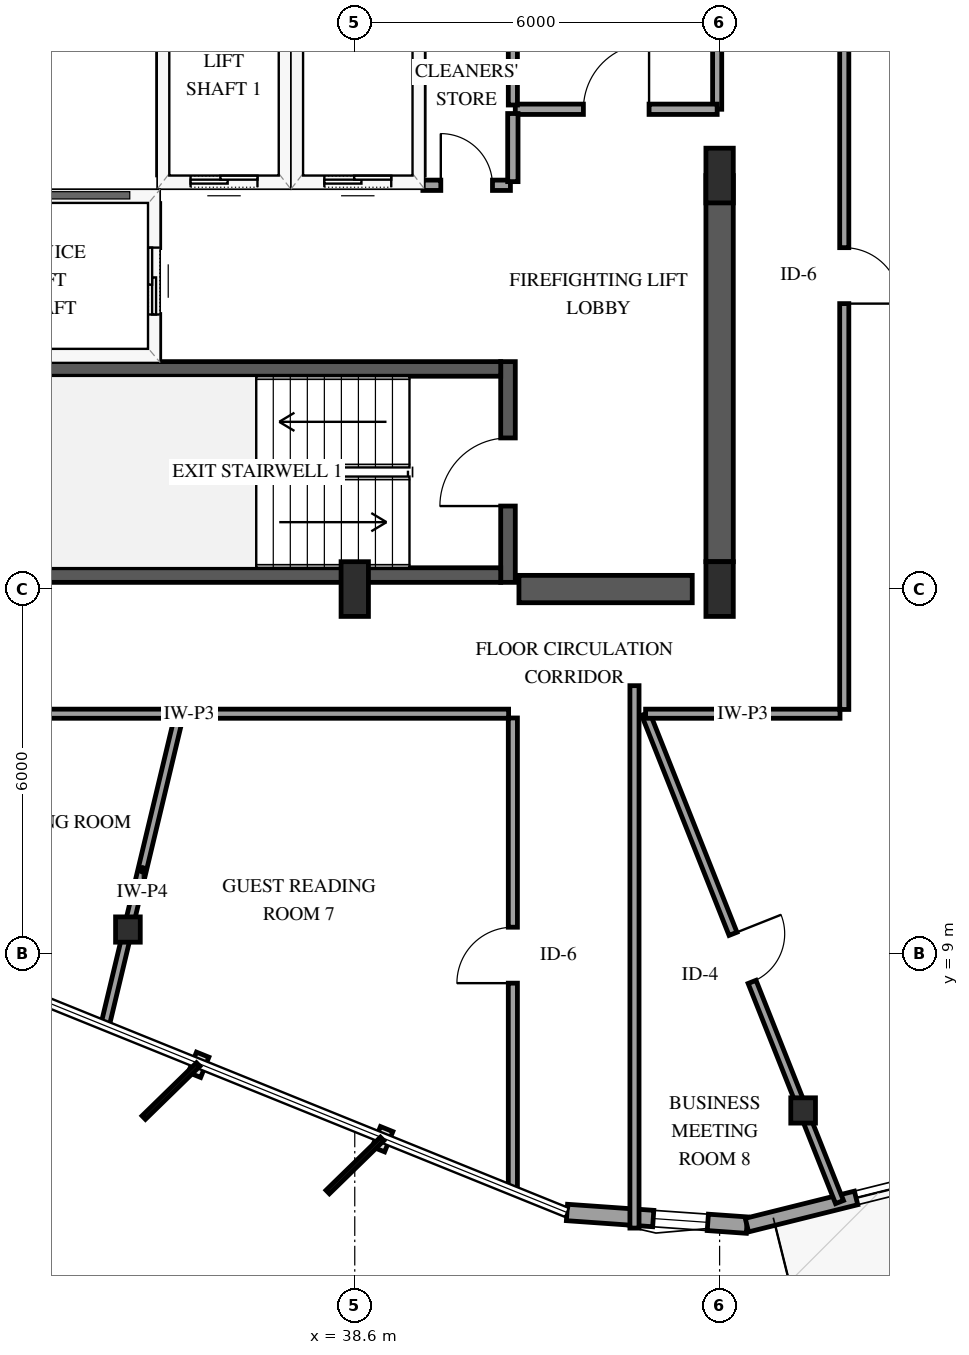
"""IFC4 building model, lengths in metres.
Left out: names, types, materials, properties, quantities, classifications, styles, units other than length and angle.
Written with IfcOpenShell. Run it as: python <this file> out.ifc"""

import sys

from ifc_helpers import new_model, si_unit, direction, frame, frame_2d, origin, origin_2d, place, context, subcontext, project, spatial, rectangle, i_section, extrude, element, fill, save


model = new_model("IFC4")
c1 = context("Model", 3, precision=1e-05, world=origin(), true_north=direction((0.0, 1.0)))
c2 = subcontext(c1, "Body", "Model", "MODEL_VIEW")
j1 = project(units=[si_unit("LENGTHUNIT", "METRE"), si_unit("PLANEANGLEUNIT", "RADIAN")], contexts=[c1])
p1 = place(None, origin())
s1 = spatial("IfcSite", under=j1, at=p1, CompositionType="ELEMENT")
p2 = place(p1, origin())
s2 = spatial("IfcBuilding", under=s1, at=p2, CompositionType="ELEMENT")
p3 = place(p2, frame((0.0, 0.0, 215.8)))
s3 = spatial("IfcBuildingStorey", under=s2, at=p3, CompositionType="ELEMENT", Elevation=215.8)
p4 = place(p3, frame((41.12, 15.11, 0.0), z_axis=(0.0, 0.0, 1.0), x_axis=(0.0, 1.0, 0.0)))
e1 = element("IfcWall", 1, at=p4, inside=s3, PredefinedType="SHEAR", context=c2, shape_type="SweptSolid", body=[
    extrude(rectangle(XDim=3.63, YDim=0.24, at=frame_2d((1.815, 0.0))), origin(), (0.0, 0.0, 1.0), 3.6),
])
p5 = place(p4, frame((1.255, 0.0, 0.0)))
e2 = element("IfcOpeningElement", 2, at=p5, cuts=e1, PredefinedType="OPENING", context=c2, shape_type="SweptSolid", body=[
    extrude(rectangle(XDim=1.12, YDim=2.15, at=frame_2d((0.56, 1.075))), frame((0.0, 0.13, 0.0), z_axis=(0.0, -1.0, 0.0), x_axis=(1.0, 0.0, 0.0)), (0.0, 0.0, 1.0), 0.26),
])
for number, where, z_axis, x_axis in (
    (3, (33.0, 15.23, 0.0), (0.0, 0.0, 1.0), (1.0, 0.0, 0.0)),
    (4, (33.0, 18.62, 0.0), (0.0, 0.0, 1.0), (1.0, 0.0, 0.0)),
):
    element("IfcWall", number, at=place(p3, frame(where, z_axis=z_axis, x_axis=x_axis)), inside=s3, PredefinedType="SHEAR", context=c2, shape_type="SweptSolid", body=[
        extrude(rectangle(XDim=8.0, YDim=0.24, at=frame_2d((4.0, 0.0))), origin(), (0.0, 0.0, 1.0), 3.6),
    ])
p6 = place(p3, frame((41.3, 15.0, 0.0), z_axis=(0.0, 0.0, 1.0), x_axis=(1.0, 0.0, 0.0)))
e5 = element("IfcWall", 5, at=p6, inside=s3, PredefinedType="SHEAR", context=c2, shape_type="SweptSolid", body=[
    extrude(rectangle(XDim=2.85, YDim=0.45, at=frame_2d((1.425, 0.0))), origin(), (0.0, 0.0, 1.0), 3.6),
])
p7 = place(p3, frame((44.6, 15.45, 0.0), z_axis=(0.0, 0.0, 1.0), x_axis=(0.0, 1.0, 0.0)))
e6 = element("IfcWall", 6, at=p7, inside=s3, PredefinedType="SHEAR", context=c2, shape_type="SweptSolid", body=[
    extrude(rectangle(XDim=6.35, YDim=0.45, at=frame_2d((3.175, 0.0))), origin(), (0.0, 0.0, 1.0), 3.6),
])
for number, where, z_axis, x_axis in (
    (7, (38.6, 15.0, 0.0), (0.0, 0.0, 1.0), (1.0, 0.0, 0.0)),
    (8, (44.6, 15.0, 0.0), (0.0, 0.0, 1.0), (1.0, 0.0, 0.0)),
    (9, (44.6, 21.8, 0.0), (0.0, 0.0, 1.0), (1.0, 0.0, 0.0)),
):
    element("IfcColumn", number, at=place(p3, frame(where, z_axis=z_axis, x_axis=x_axis)), inside=s3, PredefinedType="PILASTER", context=c2, shape_type="SweptSolid", body=[
        extrude(rectangle(XDim=0.45, YDim=0.9, at=origin_2d()), origin(), (0.0, 0.0, 1.0), 3.6),
    ])
for number, where, z_axis, x_axis in (
    (10, (34.87, 9.401, 0.0), (0.0, 0.0, 1.0), (1.0, 0.0, 0.0)),
    (11, (45.973, 6.426, 0.0), (0.0, 0.0, 1.0), (1.0, 0.0, 0.0)),
):
    element("IfcColumn", number, at=place(p3, frame(where, z_axis=z_axis, x_axis=x_axis)), inside=s3, PredefinedType="COLUMN", context=c2, shape_type="SweptSolid", body=[
        extrude(i_section(OverallWidth=0.406, OverallDepth=0.416, WebThickness=0.03, FlangeThickness=0.048, FilletRadius=0.038, at=origin_2d()), origin(), (0.0, 0.0, 1.0), 3.6),
    ])
p8 = place(p3, frame((42.09, 4.748, 0.0), z_axis=(0.0, 0.0, 1.0), x_axis=(0.997538688481, -0.070118221482, 0.0)))
e12 = element("IfcWall", 12, at=p8, inside=s3, PredefinedType="SOLIDWALL", context=c2, shape_type="SweptSolid", body=[
    extrude(rectangle(XDim=2.967, YDim=0.27, at=frame_2d((1.483, 0.0))), origin(), (0.0, 0.0, 1.0), 2.679),
])
p9 = place(p8, frame((1.422, 0.0, 0.75)))
e13 = element("IfcOpeningElement", 13, at=p9, cuts=e12, PredefinedType="OPENING", context=c2, shape_type="SweptSolid", body=[
    extrude(rectangle(XDim=0.9, YDim=1.5, at=frame_2d((0.45, 0.75))), frame((0.0, 0.145, 0.0), z_axis=(0.0, -1.0, 0.0), x_axis=(1.0, 0.0, 0.0)), (0.0, 0.0, 1.0), 0.29),
])
p10 = place(p3, frame((45.049, 4.54, 0.0), z_axis=(0.0, 0.0, 1.0), x_axis=(0.970379664845, 0.241584987229, 0.0)))
e14 = element("IfcWall", 14, at=p10, inside=s3, PredefinedType="SOLIDWALL", context=c2, shape_type="SweptSolid", body=[
    extrude(rectangle(XDim=9.791, YDim=0.23, at=frame_2d((4.895, 0.0))), origin(), (0.0, 0.0, 1.0), 2.679),
])
p11 = place(p10, frame((4.395, 0.0, 0.0)))
e15 = element("IfcOpeningElement", 15, at=p11, cuts=e14, PredefinedType="OPENING", context=c2, shape_type="SweptSolid", body=[
    extrude(rectangle(XDim=1.0, YDim=2.15, at=frame_2d((0.5, 1.075))), frame((0.0, 0.125, 0.0), z_axis=(0.0, -1.0, 0.0), x_axis=(1.0, 0.0, 0.0)), (0.0, 0.0, 1.0), 0.25),
])
p12 = place(p10, frame((1.85, 0.0, 0.72)))
e16 = element("IfcOpeningElement", 16, at=p12, cuts=e14, PredefinedType="OPENING", context=c2, shape_type="SweptSolid", body=[
    extrude(rectangle(XDim=1.2, YDim=1.6, at=frame_2d((0.6, 0.8))), frame((0.0, 0.125, 0.0), z_axis=(0.0, -1.0, 0.0), x_axis=(1.0, 0.0, 0.0)), (0.0, 0.0, 1.0), 0.25),
])
p13 = place(p10, frame((6.035, 0.0, 0.72)))
e17 = element("IfcOpeningElement", 17, at=p13, cuts=e14, PredefinedType="OPENING", context=c2, shape_type="SweptSolid", body=[
    extrude(rectangle(XDim=1.2, YDim=1.6, at=frame_2d((0.6, 0.8))), frame((0.0, 0.125, 0.0), z_axis=(0.0, -1.0, 0.0), x_axis=(1.0, 0.0, 0.0)), (0.0, 0.0, 1.0), 0.25),
])
p14 = place(p3, frame((35.45, 21.7, 0.0), z_axis=(0.0, 0.0, 1.0), x_axis=(1.0, 0.0, 0.0)))
e18 = element("IfcWall", 18, at=p14, inside=s3, PredefinedType="SOLIDWALL", context=c2, shape_type="SweptSolid", body=[
    extrude(rectangle(XDim=2.0, YDim=0.185, at=frame_2d((1.0, 0.0))), origin(), (0.0, 0.0, 1.0), 3.3),
])
p15 = place(p14, frame((0.45, 0.0, 0.0)))
e19 = element("IfcOpeningElement", 19, at=p15, cuts=e18, PredefinedType="OPENING", context=c2, shape_type="SweptSolid", body=[
    extrude(rectangle(XDim=1.1, YDim=2.15, at=frame_2d((0.55, 1.075))), frame((0.0, 0.103, 0.0), z_axis=(0.0, -1.0, 0.0), x_axis=(1.0, 0.0, 0.0)), (0.0, 0.0, 1.0), 0.205),
])
for number, where, z_axis, x_axis in (
    (20, (35.45, 21.81, 0.0), (0.0, 0.0, 1.0), (0.0, 1.0, 0.0)),
    (21, (37.45, 21.81, 0.0), (0.0, 0.0, 1.0), (0.0, 1.0, 0.0)),
):
    element("IfcWall", number, at=place(p3, frame(where, z_axis=z_axis, x_axis=x_axis)), inside=s3, PredefinedType="SOLIDWALL", context=c2, shape_type="SweptSolid", body=[
        extrude(rectangle(XDim=2.38, YDim=0.185, at=frame_2d((1.19, 0.0))), origin(), (0.0, 0.0, 1.0), 3.3),
    ])
p16 = place(p3, frame((37.65, 21.7, 0.0), z_axis=(0.0, 0.0, 1.0), x_axis=(1.0, 0.0, 0.0)))
e22 = element("IfcWall", 22, at=p16, inside=s3, PredefinedType="SOLIDWALL", context=c2, shape_type="SweptSolid", body=[
    extrude(rectangle(XDim=2.0, YDim=0.185, at=frame_2d((1.0, 0.0))), origin(), (0.0, 0.0, 1.0), 3.3),
])
p17 = place(p16, frame((0.45, 0.0, 0.0)))
e23 = element("IfcOpeningElement", 23, at=p17, cuts=e22, PredefinedType="OPENING", context=c2, shape_type="SweptSolid", body=[
    extrude(rectangle(XDim=1.1, YDim=2.15, at=frame_2d((0.55, 1.075))), frame((0.0, 0.103, 0.0), z_axis=(0.0, -1.0, 0.0), x_axis=(1.0, 0.0, 0.0)), (0.0, 0.0, 1.0), 0.205),
])
p18 = place(p3, frame((39.65, 21.81, 0.0), z_axis=(0.0, 0.0, 1.0), x_axis=(0.0, 1.0, 0.0)))
e24 = element("IfcWall", 24, at=p18, inside=s3, PredefinedType="SOLIDWALL", context=c2, shape_type="SweptSolid", body=[
    extrude(rectangle(XDim=2.38, YDim=0.185, at=frame_2d((1.19, 0.0))), origin(), (0.0, 0.0, 1.0), 3.3),
])
p19 = place(p3, frame((32.72, 21.45, 0.0), z_axis=(0.0, 0.0, 1.0), x_axis=(1.0, 0.0, 0.0)))
e25 = element("IfcWall", 25, at=p19, inside=s3, PredefinedType="SOLIDWALL", context=c2, shape_type="SweptSolid", body=[
    extrude(rectangle(XDim=2.58, YDim=0.185, at=frame_2d((1.29, 0.0))), origin(), (0.0, 0.0, 1.0), 3.3),
])
p20 = place(p3, frame((35.3, 18.79, 0.0), z_axis=(0.0, 0.0, 1.0), x_axis=(0.0, 1.0, 0.0)))
e26 = element("IfcWall", 26, at=p20, inside=s3, PredefinedType="SOLIDWALL", context=c2, shape_type="SweptSolid", body=[
    extrude(rectangle(XDim=2.55, YDim=0.185, at=frame_2d((1.275, 0.0))), origin(), (0.0, 0.0, 1.0), 3.3),
])
p21 = place(p20, frame((0.725, 0.0, 0.0)))
e27 = element("IfcOpeningElement", 27, at=p21, cuts=e26, PredefinedType="OPENING", context=c2, shape_type="SweptSolid", body=[
    extrude(rectangle(XDim=1.1, YDim=2.15, at=frame_2d((0.55, 1.075))), frame((0.0, 0.103, 0.0), z_axis=(0.0, -1.0, 0.0), x_axis=(1.0, 0.0, 0.0)), (0.0, 0.0, 1.0), 0.205),
])
p22 = place(p3, frame((46.65, 27.258, 0.0), z_axis=(0.0, 0.0, 1.0), x_axis=(0.0, -1.0, 0.0)))
e28 = element("IfcWall", 28, at=p22, inside=s3, PredefinedType="PARTITIONING", context=c2, shape_type="SweptSolid", body=[
    extrude(rectangle(XDim=14.238, YDim=0.15, at=frame_2d((7.119, 0.0))), origin(), (0.0, 0.0, 1.0), 3.3),
])
p23 = place(p22, frame((6.644, 0.0, 0.0)))
e29 = element("IfcOpeningElement", 29, at=p23, cuts=e28, PredefinedType="OPENING", context=c2, shape_type="SweptSolid", body=[
    extrude(rectangle(XDim=0.92, YDim=2.12, at=frame_2d((0.46, 1.06))), frame((0.0, 0.085, 0.0), z_axis=(0.0, -1.0, 0.0), x_axis=(1.0, 0.0, 0.0)), (0.0, 0.0, 1.0), 0.17),
])
p24 = place(p3, frame((43.383, 12.95, 0.0), z_axis=(0.0, 0.0, 1.0), x_axis=(0.369051252382, -0.929409045101, 0.0)))
e30 = element("IfcWall", 30, at=p24, inside=s3, PredefinedType="PARTITIONING", context=c2, shape_type="SweptSolid", body=[
    extrude(rectangle(XDim=8.641, YDim=0.14, at=frame_2d((4.32, 0.0))), origin(), (0.0, 0.0, 1.0), 2.595),
])
p25 = place(p24, frame((3.895, 0.0, 0.0)))
e31 = element("IfcOpeningElement", 31, at=p25, cuts=e30, PredefinedType="OPENING", context=c2, shape_type="SweptSolid", body=[
    extrude(rectangle(XDim=0.85, YDim=2.1, at=frame_2d((0.425, 1.05))), frame((0.0, 0.08, 0.0), z_axis=(0.0, -1.0, 0.0), x_axis=(1.0, 0.0, 0.0)), (0.0, 0.0, 1.0), 0.16),
])
p26 = place(p3, frame((41.2, 5.108, 0.0), z_axis=(0.0, 0.0, 1.0), x_axis=(0.0, 1.0, 0.0)))
e32 = element("IfcWall", 32, at=p26, inside=s3, PredefinedType="PARTITIONING", context=c2, shape_type="SweptSolid", body=[
    extrude(rectangle(XDim=7.772, YDim=0.15, at=frame_2d((3.886, 0.0))), origin(), (0.0, 0.0, 1.0), 3.3),
])
p27 = place(p26, frame((3.411, 0.0, 0.0)))
e33 = element("IfcOpeningElement", 33, at=p27, cuts=e32, PredefinedType="OPENING", context=c2, shape_type="SweptSolid", body=[
    extrude(rectangle(XDim=0.92, YDim=2.12, at=frame_2d((0.46, 1.06))), frame((0.0, 0.085, 0.0), z_axis=(0.0, -1.0, 0.0), x_axis=(1.0, 0.0, 0.0)), (0.0, 0.0, 1.0), 0.17),
])
p28 = place(p3, frame((44.56, 29.8, 0.0), z_axis=(0.0, 0.0, 1.0), x_axis=(0.0, -1.0, 0.0)))
e34 = element("IfcWall", 34, at=p28, inside=s3, PredefinedType="PARTITIONING", context=c2, shape_type="SweptSolid", body=[
    extrude(rectangle(XDim=6.91, YDim=0.15, at=frame_2d((3.455, 0.0))), origin(), (0.0, 0.0, 1.0), 2.34),
])
p29 = place(p28, frame((2.915, 0.0, 0.0)))
e35 = element("IfcOpeningElement", 35, at=p29, cuts=e34, PredefinedType="OPENING", context=c2, shape_type="SweptSolid", body=[
    extrude(rectangle(XDim=1.08, YDim=2.15, at=frame_2d((0.54, 1.075))), frame((0.0, 0.085, 0.0), z_axis=(0.0, -1.0, 0.0), x_axis=(1.0, 0.0, 0.0)), (0.0, 0.0, 1.0), 0.17),
])
p30 = place(p3, frame((41.13, 12.95, 0.0), z_axis=(0.0, 0.0, 1.0), x_axis=(-1.0, 0.0, 0.0)))
e36 = element("IfcWall", 36, at=p30, inside=s3, PredefinedType="PARTITIONING", context=c2, shape_type="SweptSolid", body=[
    extrude(rectangle(XDim=5.411, YDim=0.15, at=frame_2d((2.706, 0.0))), origin(), (0.0, 0.0, 1.0), 3.3),
])
p31 = place(p3, frame((35.719, 12.95, 0.0), z_axis=(0.0, 0.0, 1.0), x_axis=(-0.232634127557, -0.972564323166, 0.0)))
e37 = element("IfcWall", 37, at=p31, inside=s3, PredefinedType="PARTITIONING", context=c2, shape_type="SweptSolid", body=[
    extrude(rectangle(XDim=5.275, YDim=0.14, at=frame_2d((2.637, 0.0))), origin(), (0.0, 0.0, 1.0), 2.595),
])
p32 = place(p3, frame((35.719, 12.95, 0.0), z_axis=(0.0, 0.0, 1.0), x_axis=(-1.0, 0.0, 0.0)))
e38 = element("IfcWall", 38, at=p32, inside=s3, PredefinedType="PARTITIONING", context=c2, shape_type="SweptSolid", body=[
    extrude(rectangle(XDim=5.099, YDim=0.15, at=frame_2d((2.549, 0.0))), origin(), (0.0, 0.0, 1.0), 3.3),
])
p33 = place(p3, frame((41.24, 22.89, 0.0), z_axis=(0.0, 0.0, 1.0), x_axis=(1.0, 0.0, 0.0)))
e39 = element("IfcWall", 39, at=p33, inside=s3, PredefinedType="PARTITIONING", context=c2, shape_type="SweptSolid", body=[
    extrude(rectangle(XDim=3.32, YDim=0.17, at=frame_2d((1.66, 0.0))), origin(), (0.0, 0.0, 1.0), 3.3),
])
p34 = place(p33, frame((1.12, 0.0, 0.0)))
e40 = element("IfcOpeningElement", 40, at=p34, cuts=e39, PredefinedType="OPENING", context=c2, shape_type="SweptSolid", body=[
    extrude(rectangle(XDim=1.08, YDim=2.15, at=frame_2d((0.54, 1.075))), frame((0.0, 0.095, 0.0), z_axis=(0.0, -1.0, 0.0), x_axis=(1.0, 0.0, 0.0)), (0.0, 0.0, 1.0), 0.19),
])
p35 = place(p3, frame((46.58, 12.95, 0.0), z_axis=(0.0, 0.0, 1.0), x_axis=(-1.0, 0.0, 0.0)))
e41 = element("IfcWall", 41, at=p35, inside=s3, PredefinedType="PARTITIONING", context=c2, shape_type="SweptSolid", body=[
    extrude(rectangle(XDim=3.197, YDim=0.15, at=frame_2d((1.599, 0.0))), origin(), (0.0, 0.0, 1.0), 3.3),
])
p36 = place(p3, frame((41.2, 22.96, 0.0), z_axis=(0.0, 0.0, 1.0), x_axis=(0.0, 1.0, 0.0)))
e42 = element("IfcWall", 42, at=p36, inside=s3, PredefinedType="PARTITIONING", context=c2, shape_type="SweptSolid", body=[
    extrude(rectangle(XDim=1.69, YDim=0.15, at=frame_2d((0.845, 0.0))), origin(), (0.0, 0.0, 1.0), 3.3),
])
p37 = place(p3, frame((39.72, 21.64, 0.0), z_axis=(0.0, 0.0, 1.0), x_axis=(1.0, 0.0, 0.0)))
e43 = element("IfcWall", 43, at=p37, inside=s3, PredefinedType="PARTITIONING", context=c2, shape_type="SweptSolid", body=[
    extrude(rectangle(XDim=1.44, YDim=0.17, at=frame_2d((0.72, 0.0))), origin(), (0.0, 0.0, 1.0), 3.3),
])
p38 = place(p37, frame((0.295, 0.0, 0.0)))
e44 = element("IfcOpeningElement", 44, at=p38, cuts=e43, PredefinedType="OPENING", context=c2, shape_type="SweptSolid", body=[
    extrude(rectangle(XDim=0.85, YDim=2.1, at=frame_2d((0.425, 1.05))), frame((0.0, 0.095, 0.0), z_axis=(0.0, -1.0, 0.0), x_axis=(1.0, 0.0, 0.0)), (0.0, 0.0, 1.0), 0.19),
])
p39 = place(p3, frame((41.2, 21.7, 0.0), z_axis=(0.0, 0.0, 1.0), x_axis=(0.0, 1.0, 0.0)))
e45 = element("IfcWall", 45, at=p39, inside=s3, PredefinedType="PARTITIONING", context=c2, shape_type="SweptSolid", body=[
    extrude(rectangle(XDim=1.12, YDim=0.17, at=frame_2d((0.56, 0.0))), origin(), (0.0, 0.0, 1.0), 3.3),
])
p40 = place(p3, frame((43.2, 13.411, 0.0), z_axis=(0.0, 0.0, 1.0), x_axis=(0.0, -1.0, 0.0)))
e46 = element("IfcWall", 46, at=p40, inside=s3, PredefinedType="PARTITIONING", context=c2, shape_type="SweptSolid", body=[
    extrude(rectangle(XDim=8.92, YDim=0.15, at=frame_2d((4.46, 0.0))), origin(), (0.0, 0.0, 1.0), 3.3),
])
p41 = place(p9, origin())
e47 = element("IfcWindow", 47, at=p41, inside=s3, PartitioningType="SINGLE_PANEL", PredefinedType="WINDOW", context=c2, shape_type="SweptSolid", body=[
    extrude(rectangle(XDim=0.9, YDim=1.5, at=frame_2d((0.45, 0.75))), frame((0.0, 0.03, 0.0), z_axis=(0.0, -1.0, 0.0), x_axis=(1.0, 0.0, 0.0)), (0.0, 0.0, 1.0), 0.06),
])
fill(e13, e47)
p42 = place(p12, origin())
e48 = element("IfcWindow", 48, at=p42, inside=s3, PartitioningType="SINGLE_PANEL", PredefinedType="WINDOW", context=c2, shape_type="SweptSolid", body=[
    extrude(rectangle(XDim=1.2, YDim=1.6, at=frame_2d((0.6, 0.8))), frame((0.0, 0.03, 0.0), z_axis=(0.0, -1.0, 0.0), x_axis=(1.0, 0.0, 0.0)), (0.0, 0.0, 1.0), 0.06),
])
fill(e16, e48)
p43 = place(p15, origin())
e49 = element("IfcDoor", 49, at=p43, inside=s3, OperationType="SLIDING_TO_LEFT", PredefinedType="DOOR", context=c2, shape_type="SweptSolid", body=[
    extrude(rectangle(XDim=1.1, YDim=2.15, at=frame_2d((0.55, 1.075))), frame((0.0, 0.025, 0.0), z_axis=(0.0, -1.0, 0.0), x_axis=(1.0, 0.0, 0.0)), (0.0, 0.0, 1.0), 0.05),
])
fill(e19, e49)
p44 = place(p17, origin())
e50 = element("IfcDoor", 50, at=p44, inside=s3, OperationType="SLIDING_TO_LEFT", PredefinedType="DOOR", context=c2, shape_type="SweptSolid", body=[
    extrude(rectangle(XDim=1.1, YDim=2.15, at=frame_2d((0.55, 1.075))), frame((0.0, 0.025, 0.0), z_axis=(0.0, -1.0, 0.0), x_axis=(1.0, 0.0, 0.0)), (0.0, 0.0, 1.0), 0.05),
])
fill(e23, e50)
p45 = place(p21, origin())
e51 = element("IfcDoor", 51, at=p45, inside=s3, OperationType="SLIDING_TO_LEFT", PredefinedType="DOOR", context=c2, shape_type="SweptSolid", body=[
    extrude(rectangle(XDim=1.1, YDim=2.15, at=frame_2d((0.55, 1.075))), frame((0.0, 0.025, 0.0), z_axis=(0.0, -1.0, 0.0), x_axis=(1.0, 0.0, 0.0)), (0.0, 0.0, 1.0), 0.05),
])
fill(e27, e51)
p46 = place(p5, origin())
e52 = element("IfcDoor", 52, at=p46, inside=s3, OperationType="SINGLE_SWING_LEFT", PredefinedType="DOOR", context=c2, shape_type="SweptSolid", body=[
    extrude(rectangle(XDim=1.12, YDim=2.15, at=frame_2d((0.56, 1.075))), frame((0.0, 0.025, 0.0), z_axis=(0.0, -1.0, 0.0), x_axis=(1.0, 0.0, 0.0)), (0.0, 0.0, 1.0), 0.05),
])
fill(e2, e52)
p47 = place(p23, origin())
e53 = element("IfcDoor", 53, at=p47, inside=s3, OperationType="SINGLE_SWING_RIGHT", PredefinedType="DOOR", context=c2, shape_type="SweptSolid", body=[
    extrude(rectangle(XDim=0.92, YDim=2.12, at=frame_2d((0.46, 1.06))), frame((0.0, 0.025, 0.0), z_axis=(0.0, -1.0, 0.0), x_axis=(1.0, 0.0, 0.0)), (0.0, 0.0, 1.0), 0.05),
])
fill(e29, e53)
p48 = place(p25, origin())
e54 = element("IfcDoor", 54, at=p48, inside=s3, OperationType="SINGLE_SWING_LEFT", PredefinedType="DOOR", context=c2, shape_type="SweptSolid", body=[
    extrude(rectangle(XDim=0.85, YDim=2.1, at=frame_2d((0.425, 1.05))), frame((0.0, 0.025, 0.0), z_axis=(0.0, -1.0, 0.0), x_axis=(1.0, 0.0, 0.0)), (0.0, 0.0, 1.0), 0.05),
])
fill(e31, e54)
p49 = place(p27, origin())
e55 = element("IfcDoor", 55, at=p49, inside=s3, OperationType="SINGLE_SWING_LEFT", PredefinedType="DOOR", context=c2, shape_type="SweptSolid", body=[
    extrude(rectangle(XDim=0.92, YDim=2.12, at=frame_2d((0.46, 1.06))), frame((0.0, 0.025, 0.0), z_axis=(0.0, -1.0, 0.0), x_axis=(1.0, 0.0, 0.0)), (0.0, 0.0, 1.0), 0.05),
])
fill(e33, e55)
p50 = place(p34, origin())
e56 = element("IfcDoor", 56, at=p50, inside=s3, OperationType="SINGLE_SWING_RIGHT", PredefinedType="DOOR", context=c2, shape_type="SweptSolid", body=[
    extrude(rectangle(XDim=1.08, YDim=2.15, at=frame_2d((0.54, 1.075))), frame((0.0, 0.025, 0.0), z_axis=(0.0, -1.0, 0.0), x_axis=(1.0, 0.0, 0.0)), (0.0, 0.0, 1.0), 0.05),
])
fill(e40, e56)
p51 = place(p38, origin())
e57 = element("IfcDoor", 57, at=p51, inside=s3, OperationType="SINGLE_SWING_LEFT", PredefinedType="DOOR", context=c2, shape_type="SweptSolid", body=[
    extrude(rectangle(XDim=0.85, YDim=2.1, at=frame_2d((0.425, 1.05))), frame((0.0, 0.025, 0.0), z_axis=(0.0, -1.0, 0.0), x_axis=(1.0, 0.0, 0.0)), (0.0, 0.0, 1.0), 0.05),
])
fill(e44, e57)
save(model, sys.argv[1])
